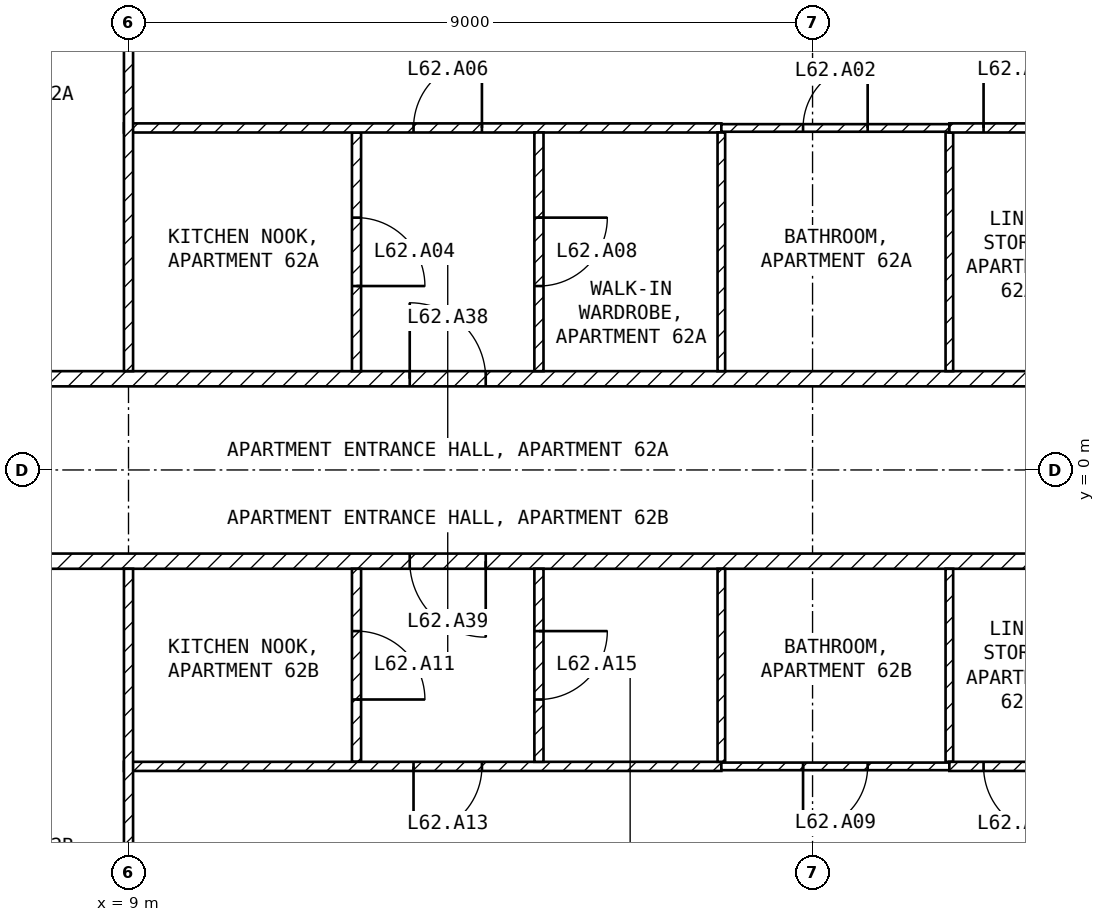
"""IFC4 building model, lengths in metres.
Left out: names, types, materials, properties, quantities, classifications, styles, units other than length and angle.
Written with IfcOpenShell. Run it as: python <this file> out.ifc"""

import sys

from ifc_helpers import new_model, si_unit, direction, frame, frame_2d, origin, place, context, subcontext, project, spatial, rectangle, extrude, element, fill, save


model = new_model("IFC4")
c1 = context("Model", 3, precision=1e-05, world=origin(), true_north=direction((0.0, 1.0)))
c2 = subcontext(c1, "Body", "Model", "MODEL_VIEW")
j1 = project(units=[si_unit("LENGTHUNIT", "METRE"), si_unit("PLANEANGLEUNIT", "RADIAN")], contexts=[c1])
p1 = place(None, origin())
s1 = spatial("IfcSite", under=j1, at=p1, CompositionType="ELEMENT")
p2 = place(p1, origin())
s2 = spatial("IfcBuilding", under=s1, at=p2, CompositionType="ELEMENT")
p3 = place(p2, frame((0.0, 0.0, 246.5)))
s3 = spatial("IfcBuildingStorey", under=s2, at=p3, CompositionType="ELEMENT", Elevation=246.5)
p4 = place(p3, frame((4.4, 1.2, 0.0), z_axis=(0.0, 0.0, 1.0), x_axis=(1.0, 0.0, 0.0)))
e1 = element("IfcWall", 1, at=p4, inside=s3, PredefinedType="PARTITIONING", context=c2, shape_type="SweptSolid", body=[
    extrude(rectangle(XDim=17.2, YDim=0.2, at=frame_2d((8.6, 0.0))), origin(), (0.0, 0.0, 1.0), 3.25),
])
p5 = place(p4, frame((8.3, 0.0, 0.0)))
e2 = element("IfcOpeningElement", 2, at=p5, cuts=e1, PredefinedType="OPENING", context=c2, shape_type="SweptSolid", body=[
    extrude(rectangle(XDim=1.0, YDim=2.1, at=frame_2d((0.5, 1.05))), frame((0.0, 0.11, 0.0), z_axis=(0.0, -1.0, 0.0), x_axis=(1.0, 0.0, 0.0)), (0.0, 0.0, 1.0), 0.22),
])
p6 = place(p3, frame((21.6, -1.2, 0.0), z_axis=(0.0, 0.0, 1.0), x_axis=(-1.0, 0.0, 0.0)))
e3 = element("IfcWall", 3, at=p6, inside=s3, PredefinedType="PARTITIONING", context=c2, shape_type="SweptSolid", body=[
    extrude(rectangle(XDim=17.2, YDim=0.2, at=frame_2d((8.6, 0.0))), origin(), (0.0, 0.0, 1.0), 3.25),
])
p7 = place(p6, frame((7.9, 0.0, 0.0)))
e4 = element("IfcOpeningElement", 4, at=p7, cuts=e3, PredefinedType="OPENING", context=c2, shape_type="SweptSolid", body=[
    extrude(rectangle(XDim=1.0, YDim=2.1, at=frame_2d((0.5, 1.05))), frame((0.0, 0.11, 0.0), z_axis=(0.0, -1.0, 0.0), x_axis=(1.0, 0.0, 0.0)), (0.0, 0.0, 1.0), 0.22),
])
p8 = place(p3, frame((12.0, 4.44, 0.0), z_axis=(0.0, 0.0, 1.0), x_axis=(0.0, -1.0, 0.0)))
e5 = element("IfcWall", 5, at=p8, inside=s3, PredefinedType="PARTITIONING", context=c2, shape_type="SweptSolid", body=[
    extrude(rectangle(XDim=3.14, YDim=0.12, at=frame_2d((1.57, 0.0))), origin(), (0.0, 0.0, 1.0), 3.25),
])
p9 = place(p8, frame((1.12, 0.0, 0.0)))
e6 = element("IfcOpeningElement", 6, at=p9, cuts=e5, PredefinedType="OPENING", context=c2, shape_type="SweptSolid", body=[
    extrude(rectangle(XDim=0.9, YDim=2.1, at=frame_2d((0.45, 1.05))), frame((0.0, 0.07, 0.0), z_axis=(0.0, -1.0, 0.0), x_axis=(1.0, 0.0, 0.0)), (0.0, 0.0, 1.0), 0.14),
])
p10 = place(p3, frame((8.94, 4.5, 0.0), z_axis=(0.0, 0.0, 1.0), x_axis=(1.0, 0.0, 0.0)))
e7 = element("IfcWall", 7, at=p10, inside=s3, PredefinedType="PARTITIONING", context=c2, shape_type="SweptSolid", body=[
    extrude(rectangle(XDim=7.86, YDim=0.12, at=frame_2d((3.93, 0.0))), origin(), (0.0, 0.0, 1.0), 3.25),
])
p11 = place(p10, frame((3.81, 0.0, 0.0)))
e8 = element("IfcOpeningElement", 8, at=p11, cuts=e7, PredefinedType="OPENING", context=c2, shape_type="SweptSolid", body=[
    extrude(rectangle(XDim=0.9, YDim=2.1, at=frame_2d((0.45, 1.05))), frame((0.0, 0.07, 0.0), z_axis=(0.0, -1.0, 0.0), x_axis=(1.0, 0.0, 0.0)), (0.0, 0.0, 1.0), 0.14),
])
p12 = place(p3, frame((9.0, 1.3, 0.0), z_axis=(0.0, 0.0, 1.0), x_axis=(0.0, 1.0, 0.0)))
e9 = element("IfcWall", 9, at=p12, inside=s3, PredefinedType="PARTITIONING", context=c2, shape_type="SweptSolid", body=[
    extrude(rectangle(XDim=7.62, YDim=0.12, at=frame_2d((3.81, 0.0))), origin(), (0.0, 0.0, 1.0), 3.25),
])
p13 = place(p12, frame((4.25, 0.0, 0.0)))
e10 = element("IfcOpeningElement", 10, at=p13, cuts=e9, PredefinedType="OPENING", context=c2, shape_type="SweptSolid", body=[
    extrude(rectangle(XDim=0.9, YDim=2.1, at=frame_2d((0.45, 1.05))), frame((0.0, 0.07, 0.0), z_axis=(0.0, -1.0, 0.0), x_axis=(1.0, 0.0, 0.0)), (0.0, 0.0, 1.0), 0.14),
])
p14 = place(p3, frame((14.4, 4.44, 0.0), z_axis=(0.0, 0.0, 1.0), x_axis=(0.0, -1.0, 0.0)))
e11 = element("IfcWall", 11, at=p14, inside=s3, PredefinedType="PARTITIONING", context=c2, shape_type="SweptSolid", body=[
    extrude(rectangle(XDim=3.14, YDim=0.12, at=frame_2d((1.57, 0.0))), origin(), (0.0, 0.0, 1.0), 3.25),
])
p15 = place(p14, frame((1.12, 0.0, 0.0)))
e12 = element("IfcOpeningElement", 12, at=p15, cuts=e11, PredefinedType="OPENING", context=c2, shape_type="SweptSolid", body=[
    extrude(rectangle(XDim=0.9, YDim=2.1, at=frame_2d((0.45, 1.05))), frame((0.0, 0.07, 0.0), z_axis=(0.0, -1.0, 0.0), x_axis=(1.0, 0.0, 0.0)), (0.0, 0.0, 1.0), 0.14),
])
for number, where, z_axis, x_axis in (
    (13, (16.8, 4.44, 0.0), (0.0, 0.0, 1.0), (0.0, -1.0, 0.0)),
    (14, (19.8, 4.44, 0.0), (0.0, 0.0, 1.0), (0.0, -1.0, 0.0)),
):
    element("IfcWall", number, at=place(p3, frame(where, z_axis=z_axis, x_axis=x_axis)), inside=s3, PredefinedType="PARTITIONING", context=c2, shape_type="SweptSolid", body=[
        extrude(rectangle(XDim=3.14, YDim=0.1, at=frame_2d((1.57, 0.0))), origin(), (0.0, 0.0, 1.0), 3.25),
    ])
p16 = place(p3, frame((16.8, 4.5, 0.0), z_axis=(0.0, 0.0, 1.0), x_axis=(1.0, 0.0, 0.0)))
e15 = element("IfcWall", 15, at=p16, inside=s3, PredefinedType="PARTITIONING", context=c2, shape_type="SweptSolid", body=[
    extrude(rectangle(XDim=3.0, YDim=0.1, at=frame_2d((1.5, 0.0))), origin(), (0.0, 0.0, 1.0), 3.25),
])
p17 = place(p16, frame((1.075, 0.0, 0.0)))
e16 = element("IfcOpeningElement", 16, at=p17, cuts=e15, PredefinedType="OPENING", context=c2, shape_type="SweptSolid", body=[
    extrude(rectangle(XDim=0.85, YDim=2.1, at=frame_2d((0.425, 1.05))), frame((0.0, 0.06, 0.0), z_axis=(0.0, -1.0, 0.0), x_axis=(1.0, 0.0, 0.0)), (0.0, 0.0, 1.0), 0.12),
])
p18 = place(p3, frame((19.8, 4.5, 0.0), z_axis=(0.0, 0.0, 1.0), x_axis=(1.0, 0.0, 0.0)))
e17 = element("IfcWall", 17, at=p18, inside=s3, PredefinedType="PARTITIONING", context=c2, shape_type="SweptSolid", body=[
    extrude(rectangle(XDim=1.8, YDim=0.12, at=frame_2d((0.9, 0.0))), origin(), (0.0, 0.0, 1.0), 3.25),
])
p19 = place(p18, frame((0.45, 0.0, 0.0)))
e18 = element("IfcOpeningElement", 18, at=p19, cuts=e17, PredefinedType="OPENING", context=c2, shape_type="SweptSolid", body=[
    extrude(rectangle(XDim=0.9, YDim=2.1, at=frame_2d((0.45, 1.05))), frame((0.0, 0.07, 0.0), z_axis=(0.0, -1.0, 0.0), x_axis=(1.0, 0.0, 0.0)), (0.0, 0.0, 1.0), 0.14),
])
p20 = place(p3, frame((12.0, -1.3, 0.0), z_axis=(0.0, 0.0, 1.0), x_axis=(0.0, -1.0, 0.0)))
e19 = element("IfcWall", 19, at=p20, inside=s3, PredefinedType="PARTITIONING", context=c2, shape_type="SweptSolid", body=[
    extrude(rectangle(XDim=2.54, YDim=0.12, at=frame_2d((1.27, 0.0))), origin(), (0.0, 0.0, 1.0), 3.25),
])
p21 = place(p20, frame((0.82, 0.0, 0.0)))
e20 = element("IfcOpeningElement", 20, at=p21, cuts=e19, PredefinedType="OPENING", context=c2, shape_type="SweptSolid", body=[
    extrude(rectangle(XDim=0.9, YDim=2.1, at=frame_2d((0.45, 1.05))), frame((0.0, 0.07, 0.0), z_axis=(0.0, -1.0, 0.0), x_axis=(1.0, 0.0, 0.0)), (0.0, 0.0, 1.0), 0.14),
])
p22 = place(p3, frame((16.8, -3.9, 0.0), z_axis=(0.0, 0.0, 1.0), x_axis=(-1.0, 0.0, 0.0)))
e21 = element("IfcWall", 21, at=p22, inside=s3, PredefinedType="PARTITIONING", context=c2, shape_type="SweptSolid", body=[
    extrude(rectangle(XDim=7.86, YDim=0.12, at=frame_2d((3.93, 0.0))), origin(), (0.0, 0.0, 1.0), 3.25),
])
p23 = place(p22, frame((3.15, 0.0, 0.0)))
e22 = element("IfcOpeningElement", 22, at=p23, cuts=e21, PredefinedType="OPENING", context=c2, shape_type="SweptSolid", body=[
    extrude(rectangle(XDim=0.9, YDim=2.1, at=frame_2d((0.45, 1.05))), frame((0.0, 0.07, 0.0), z_axis=(0.0, -1.0, 0.0), x_axis=(1.0, 0.0, 0.0)), (0.0, 0.0, 1.0), 0.14),
])
p24 = place(p3, frame((9.0, -8.92, 0.0), z_axis=(0.0, 0.0, 1.0), x_axis=(0.0, 1.0, 0.0)))
e23 = element("IfcWall", 23, at=p24, inside=s3, PredefinedType="PARTITIONING", context=c2, shape_type="SweptSolid", body=[
    extrude(rectangle(XDim=7.62, YDim=0.12, at=frame_2d((3.81, 0.0))), origin(), (0.0, 0.0, 1.0), 3.25),
])
p25 = place(p24, frame((2.32, 0.0, 0.0)))
e24 = element("IfcOpeningElement", 24, at=p25, cuts=e23, PredefinedType="OPENING", context=c2, shape_type="SweptSolid", body=[
    extrude(rectangle(XDim=0.9, YDim=2.1, at=frame_2d((0.45, 1.05))), frame((0.0, 0.07, 0.0), z_axis=(0.0, -1.0, 0.0), x_axis=(1.0, 0.0, 0.0)), (0.0, 0.0, 1.0), 0.14),
])
p26 = place(p3, frame((14.4, -1.3, 0.0), z_axis=(0.0, 0.0, 1.0), x_axis=(0.0, -1.0, 0.0)))
e25 = element("IfcWall", 25, at=p26, inside=s3, PredefinedType="PARTITIONING", context=c2, shape_type="SweptSolid", body=[
    extrude(rectangle(XDim=2.54, YDim=0.12, at=frame_2d((1.27, 0.0))), origin(), (0.0, 0.0, 1.0), 3.25),
])
p27 = place(p26, frame((0.82, 0.0, 0.0)))
e26 = element("IfcOpeningElement", 26, at=p27, cuts=e25, PredefinedType="OPENING", context=c2, shape_type="SweptSolid", body=[
    extrude(rectangle(XDim=0.9, YDim=2.1, at=frame_2d((0.45, 1.05))), frame((0.0, 0.07, 0.0), z_axis=(0.0, -1.0, 0.0), x_axis=(1.0, 0.0, 0.0)), (0.0, 0.0, 1.0), 0.14),
])
for number, where, z_axis, x_axis in (
    (27, (16.8, -1.3, 0.0), (0.0, 0.0, 1.0), (0.0, -1.0, 0.0)),
    (28, (19.8, -1.3, 0.0), (0.0, 0.0, 1.0), (0.0, -1.0, 0.0)),
):
    element("IfcWall", number, at=place(p3, frame(where, z_axis=z_axis, x_axis=x_axis)), inside=s3, PredefinedType="PARTITIONING", context=c2, shape_type="SweptSolid", body=[
        extrude(rectangle(XDim=2.54, YDim=0.1, at=frame_2d((1.27, 0.0))), origin(), (0.0, 0.0, 1.0), 3.25),
    ])
p28 = place(p3, frame((19.8, -3.9, 0.0), z_axis=(0.0, 0.0, 1.0), x_axis=(-1.0, 0.0, 0.0)))
e29 = element("IfcWall", 29, at=p28, inside=s3, PredefinedType="PARTITIONING", context=c2, shape_type="SweptSolid", body=[
    extrude(rectangle(XDim=3.0, YDim=0.1, at=frame_2d((1.5, 0.0))), origin(), (0.0, 0.0, 1.0), 3.25),
])
p29 = place(p28, frame((1.075, 0.0, 0.0)))
e30 = element("IfcOpeningElement", 30, at=p29, cuts=e29, PredefinedType="OPENING", context=c2, shape_type="SweptSolid", body=[
    extrude(rectangle(XDim=0.85, YDim=2.1, at=frame_2d((0.425, 1.05))), frame((0.0, 0.06, 0.0), z_axis=(0.0, -1.0, 0.0), x_axis=(1.0, 0.0, 0.0)), (0.0, 0.0, 1.0), 0.12),
])
p30 = place(p3, frame((21.6, -3.9, 0.0), z_axis=(0.0, 0.0, 1.0), x_axis=(-1.0, 0.0, 0.0)))
e31 = element("IfcWall", 31, at=p30, inside=s3, PredefinedType="PARTITIONING", context=c2, shape_type="SweptSolid", body=[
    extrude(rectangle(XDim=1.8, YDim=0.12, at=frame_2d((0.9, 0.0))), origin(), (0.0, 0.0, 1.0), 3.25),
])
p31 = place(p30, frame((0.45, 0.0, 0.0)))
e32 = element("IfcOpeningElement", 32, at=p31, cuts=e31, PredefinedType="OPENING", context=c2, shape_type="SweptSolid", body=[
    extrude(rectangle(XDim=0.9, YDim=2.1, at=frame_2d((0.45, 1.05))), frame((0.0, 0.07, 0.0), z_axis=(0.0, -1.0, 0.0), x_axis=(1.0, 0.0, 0.0)), (0.0, 0.0, 1.0), 0.14),
])
p32 = place(p17, origin())
e33 = element("IfcDoor", 33, at=p32, inside=s3, OperationType="SINGLE_SWING_RIGHT", PredefinedType="DOOR", context=c2, shape_type="SweptSolid", body=[
    extrude(rectangle(XDim=0.85, YDim=2.1, at=frame_2d((0.425, 1.05))), frame((0.0, 0.025, 0.0), z_axis=(0.0, -1.0, 0.0), x_axis=(1.0, 0.0, 0.0)), (0.0, 0.0, 1.0), 0.05),
])
fill(e16, e33)
p33 = place(p9, origin())
e34 = element("IfcDoor", 34, at=p33, inside=s3, OperationType="SINGLE_SWING_RIGHT", PredefinedType="DOOR", context=c2, shape_type="SweptSolid", body=[
    extrude(rectangle(XDim=0.9, YDim=2.1, at=frame_2d((0.45, 1.05))), frame((0.0, 0.025, 0.0), z_axis=(0.0, -1.0, 0.0), x_axis=(1.0, 0.0, 0.0)), (0.0, 0.0, 1.0), 0.05),
])
fill(e6, e34)
p34 = place(p19, origin())
e35 = element("IfcDoor", 35, at=p34, inside=s3, OperationType="SINGLE_SWING_LEFT", PredefinedType="DOOR", context=c2, shape_type="SweptSolid", body=[
    extrude(rectangle(XDim=0.9, YDim=2.1, at=frame_2d((0.45, 1.05))), frame((0.0, 0.025, 0.0), z_axis=(0.0, -1.0, 0.0), x_axis=(1.0, 0.0, 0.0)), (0.0, 0.0, 1.0), 0.05),
])
fill(e18, e35)
p35 = place(p11, origin())
e36 = element("IfcDoor", 36, at=p35, inside=s3, OperationType="SINGLE_SWING_RIGHT", PredefinedType="DOOR", context=c2, shape_type="SweptSolid", body=[
    extrude(rectangle(XDim=0.9, YDim=2.1, at=frame_2d((0.45, 1.05))), frame((0.0, 0.025, 0.0), z_axis=(0.0, -1.0, 0.0), x_axis=(1.0, 0.0, 0.0)), (0.0, 0.0, 1.0), 0.05),
])
fill(e8, e36)
p36 = place(p15, origin())
e37 = element("IfcDoor", 37, at=p36, inside=s3, OperationType="SINGLE_SWING_LEFT", PredefinedType="DOOR", context=c2, shape_type="SweptSolid", body=[
    extrude(rectangle(XDim=0.9, YDim=2.1, at=frame_2d((0.45, 1.05))), frame((0.0, 0.025, 0.0), z_axis=(0.0, -1.0, 0.0), x_axis=(1.0, 0.0, 0.0)), (0.0, 0.0, 1.0), 0.05),
])
fill(e12, e37)
p37 = place(p29, origin())
e38 = element("IfcDoor", 38, at=p37, inside=s3, OperationType="SINGLE_SWING_RIGHT", PredefinedType="DOOR", context=c2, shape_type="SweptSolid", body=[
    extrude(rectangle(XDim=0.85, YDim=2.1, at=frame_2d((0.425, 1.05))), frame((0.0, 0.025, 0.0), z_axis=(0.0, -1.0, 0.0), x_axis=(1.0, 0.0, 0.0)), (0.0, 0.0, 1.0), 0.05),
])
fill(e30, e38)
p38 = place(p21, origin())
e39 = element("IfcDoor", 39, at=p38, inside=s3, OperationType="SINGLE_SWING_RIGHT", PredefinedType="DOOR", context=c2, shape_type="SweptSolid", body=[
    extrude(rectangle(XDim=0.9, YDim=2.1, at=frame_2d((0.45, 1.05))), frame((0.0, 0.025, 0.0), z_axis=(0.0, -1.0, 0.0), x_axis=(1.0, 0.0, 0.0)), (0.0, 0.0, 1.0), 0.05),
])
fill(e20, e39)
p39 = place(p31, origin())
e40 = element("IfcDoor", 40, at=p39, inside=s3, OperationType="SINGLE_SWING_LEFT", PredefinedType="DOOR", context=c2, shape_type="SweptSolid", body=[
    extrude(rectangle(XDim=0.9, YDim=2.1, at=frame_2d((0.45, 1.05))), frame((0.0, 0.025, 0.0), z_axis=(0.0, -1.0, 0.0), x_axis=(1.0, 0.0, 0.0)), (0.0, 0.0, 1.0), 0.05),
])
fill(e32, e40)
p40 = place(p23, origin())
e41 = element("IfcDoor", 41, at=p40, inside=s3, OperationType="SINGLE_SWING_RIGHT", PredefinedType="DOOR", context=c2, shape_type="SweptSolid", body=[
    extrude(rectangle(XDim=0.9, YDim=2.1, at=frame_2d((0.45, 1.05))), frame((0.0, 0.025, 0.0), z_axis=(0.0, -1.0, 0.0), x_axis=(1.0, 0.0, 0.0)), (0.0, 0.0, 1.0), 0.05),
])
fill(e22, e41)
p41 = place(p27, origin())
e42 = element("IfcDoor", 42, at=p41, inside=s3, OperationType="SINGLE_SWING_LEFT", PredefinedType="DOOR", context=c2, shape_type="SweptSolid", body=[
    extrude(rectangle(XDim=0.9, YDim=2.1, at=frame_2d((0.45, 1.05))), frame((0.0, 0.025, 0.0), z_axis=(0.0, -1.0, 0.0), x_axis=(1.0, 0.0, 0.0)), (0.0, 0.0, 1.0), 0.05),
])
fill(e26, e42)
p42 = place(p5, origin())
e43 = element("IfcDoor", 43, at=p42, inside=s3, OperationType="SINGLE_SWING_LEFT", PredefinedType="DOOR", context=c2, shape_type="SweptSolid", body=[
    extrude(rectangle(XDim=1.0, YDim=2.1, at=frame_2d((0.5, 1.05))), frame((0.0, 0.025, 0.0), z_axis=(0.0, -1.0, 0.0), x_axis=(1.0, 0.0, 0.0)), (0.0, 0.0, 1.0), 0.05),
])
fill(e2, e43)
p43 = place(p7, origin())
e44 = element("IfcDoor", 44, at=p43, inside=s3, OperationType="SINGLE_SWING_LEFT", PredefinedType="DOOR", context=c2, shape_type="SweptSolid", body=[
    extrude(rectangle(XDim=1.0, YDim=2.1, at=frame_2d((0.5, 1.05))), frame((0.0, 0.025, 0.0), z_axis=(0.0, -1.0, 0.0), x_axis=(1.0, 0.0, 0.0)), (0.0, 0.0, 1.0), 0.05),
])
fill(e4, e44)
save(model, sys.argv[1])
